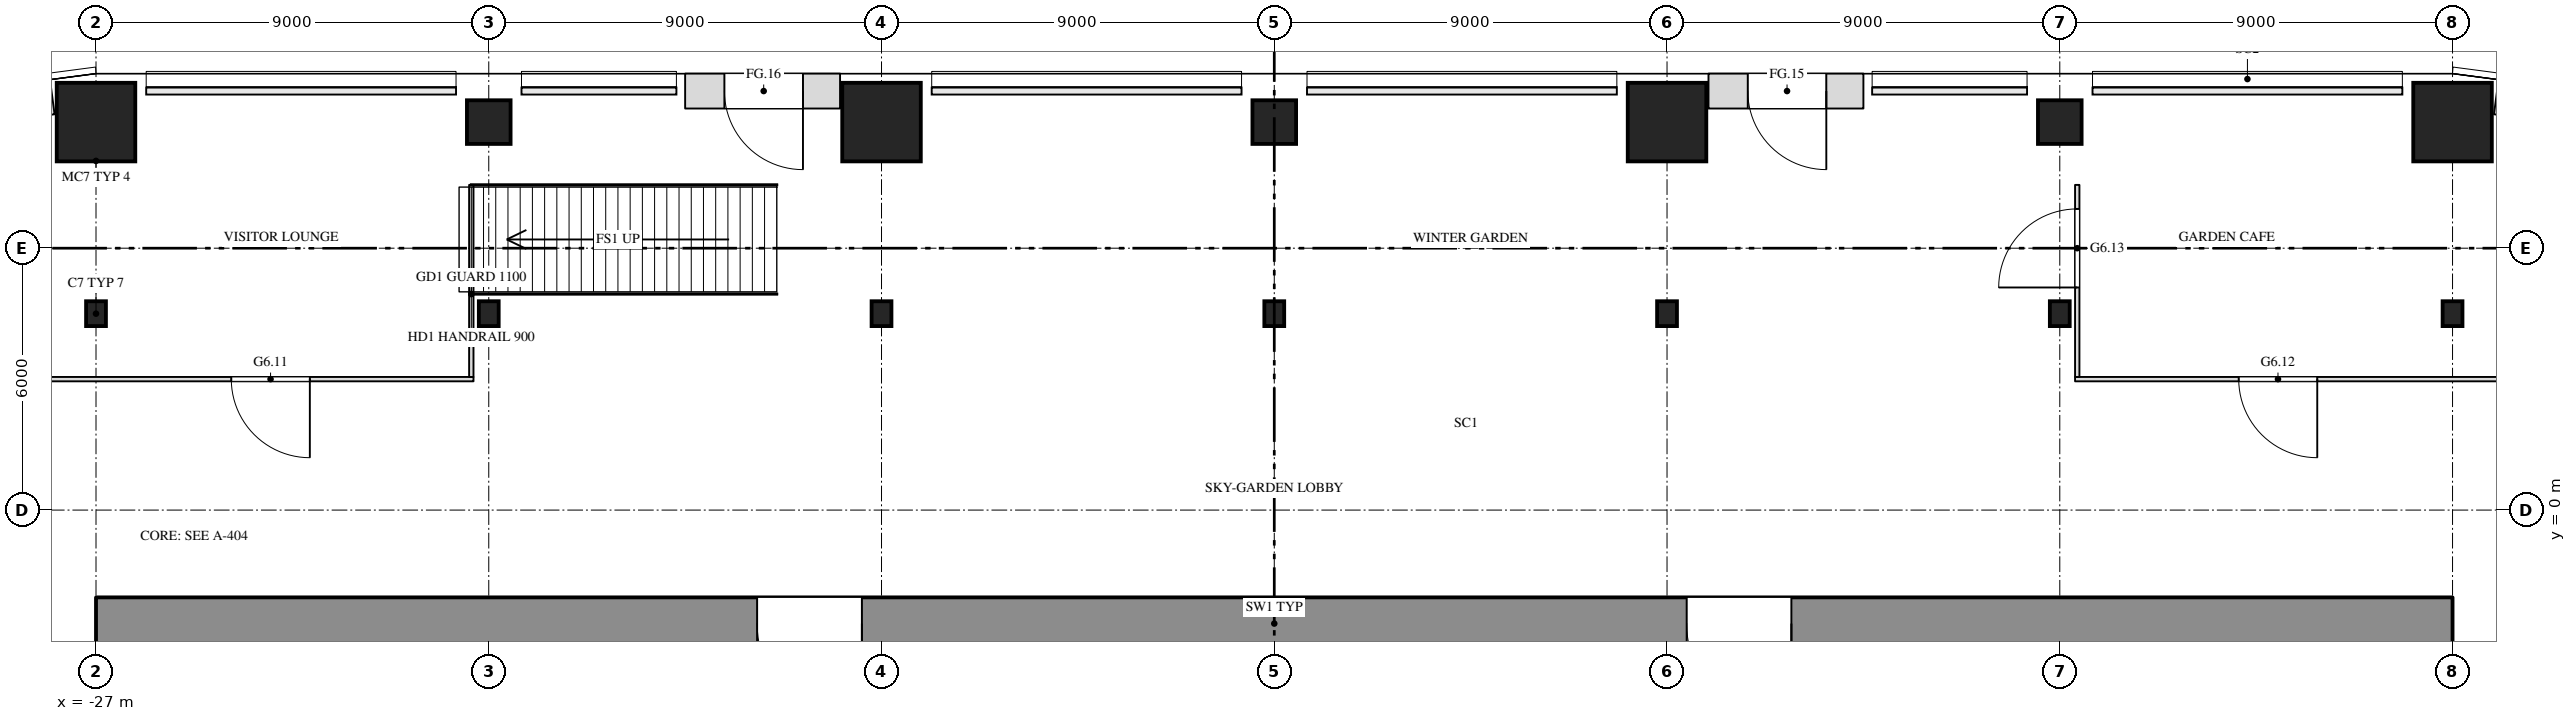
"""IFC4 building model, lengths in metres.
Left out: names, types, materials, properties, quantities, classifications, styles, units other than length and angle.
Written with IfcOpenShell. Run it as: python <this file> out.ifc"""

import sys

from ifc_helpers import new_model, si_unit, direction, frame, frame_2d, origin, origin_2d, place, context, subcontext, project, spatial, rectangle, i_section, extrude, clip, halfspace, element, fill, save


model = new_model("IFC4")
c1 = context("Model", 3, precision=1e-05, world=origin(), true_north=direction((0.0, 1.0)))
c2 = subcontext(c1, "Body", "Model", "MODEL_VIEW")
j1 = project(units=[si_unit("LENGTHUNIT", "METRE"), si_unit("PLANEANGLEUNIT", "RADIAN")], contexts=[c1])
p1 = place(None, origin())
s1 = spatial("IfcSite", under=j1, at=p1, CompositionType="ELEMENT")
p2 = place(p1, origin())
s2 = spatial("IfcBuilding", under=s1, at=p2, CompositionType="ELEMENT")
p3 = place(p2, frame((0.0, 0.0, 39.0)))
s3 = spatial("IfcBuildingStorey", under=s2, at=p3, CompositionType="ELEMENT", Elevation=39.0)
for number, where, z_axis, x_axis in (
    (1, (-27.0, 4.5, 0.0), (0.0, 0.0, 1.0), (1.0, 0.0, 0.0)),
    (2, (-18.0, 4.5, 0.0), (0.0, 0.0, 1.0), (1.0, 0.0, 0.0)),
    (3, (-9.0, 4.5, 0.0), (0.0, 0.0, 1.0), (1.0, 0.0, 0.0)),
    (4, (0.0, 4.5, 0.0), (0.0, 0.0, 1.0), (1.0, 0.0, 0.0)),
    (5, (9.0, 4.5, 0.0), (0.0, 0.0, 1.0), (1.0, 0.0, 0.0)),
    (6, (18.0, 4.5, 0.0), (0.0, 0.0, 1.0), (1.0, 0.0, 0.0)),
    (7, (27.0, 4.5, 0.0), (0.0, 0.0, 1.0), (1.0, 0.0, 0.0)),
):
    element("IfcColumn", number, at=place(p3, frame(where, z_axis=z_axis, x_axis=x_axis)), inside=s3, PredefinedType="COLUMN", context=c2, shape_type="SweptSolid", body=[
        extrude(i_section(OverallWidth=0.455, OverallDepth=0.569, WebThickness=0.078, FlangeThickness=0.125, at=origin_2d()), origin(), (0.0, 0.0, 1.0), 4.5),
    ])
p4 = place(p3, frame((-27.0, 8.0, 0.0), z_axis=(0.0, 0.595218167181, 0.80356414396), x_axis=(-1.0, 0.0, 0.0)))
e8 = element("IfcColumn", 8, at=p4, inside=s3, PredefinedType="COLUMN", context=c2, shape_type="Clipping", body=[
    clip(extrude(rectangle(XDim=1.8, YDim=1.8, at=origin_2d()), origin(), (0.0, 0.0, 1.0), 5.6), halfspace(frame((0.0, 0.0, 0.667)), True)),
])
p5 = place(p3, frame((-18.0, 8.0, 0.0), z_axis=(0.0, 0.595218167181, 0.80356414396), x_axis=(-1.0, 0.0, 0.0)))
e9 = element("IfcColumn", 9, at=p5, inside=s3, PredefinedType="COLUMN", context=c2, shape_type="Clipping", body=[
    clip(extrude(rectangle(XDim=1.0, YDim=1.0, at=origin_2d()), origin(), (0.0, 0.0, 1.0), 5.6), halfspace(frame((0.0, 0.0, 0.37)), True)),
])
p6 = place(p3, frame((-9.0, 8.0, 0.0), z_axis=(0.0, 0.595218167181, 0.80356414396), x_axis=(-1.0, 0.0, 0.0)))
e10 = element("IfcColumn", 10, at=p6, inside=s3, PredefinedType="COLUMN", context=c2, shape_type="SweptSolid", body=[
    extrude(rectangle(XDim=1.8, YDim=1.8, at=origin_2d()), origin(), (0.0, 0.0, 1.0), 5.6),
])
p7 = place(p3, frame((0.0, 8.0, 0.0), z_axis=(0.0, 0.595218167181, 0.80356414396), x_axis=(-1.0, 0.0, 0.0)))
e11 = element("IfcColumn", 11, at=p7, inside=s3, PredefinedType="COLUMN", context=c2, shape_type="SweptSolid", body=[
    extrude(rectangle(XDim=1.0, YDim=1.0, at=origin_2d()), origin(), (0.0, 0.0, 1.0), 5.6),
])
p8 = place(p3, frame((9.0, 8.0, 0.0), z_axis=(0.0, 0.595218167181, 0.80356414396), x_axis=(-1.0, 0.0, 0.0)))
e12 = element("IfcColumn", 12, at=p8, inside=s3, PredefinedType="COLUMN", context=c2, shape_type="SweptSolid", body=[
    extrude(rectangle(XDim=1.8, YDim=1.8, at=origin_2d()), origin(), (0.0, 0.0, 1.0), 5.6),
])
p9 = place(p3, frame((18.0, 8.0, 0.0), z_axis=(0.0, 0.595218167181, 0.80356414396), x_axis=(-1.0, 0.0, 0.0)))
e13 = element("IfcColumn", 13, at=p9, inside=s3, PredefinedType="COLUMN", context=c2, shape_type="Clipping", body=[
    clip(extrude(rectangle(XDim=1.0, YDim=1.0, at=origin_2d()), origin(), (0.0, 0.0, 1.0), 5.6), halfspace(frame((0.0, 0.0, 0.37)), True)),
])
p10 = place(p3, frame((27.0, 8.0, 0.0), z_axis=(0.0, 0.595218167181, 0.80356414396), x_axis=(-1.0, 0.0, 0.0)))
e14 = element("IfcColumn", 14, at=p10, inside=s3, PredefinedType="COLUMN", context=c2, shape_type="Clipping", body=[
    clip(extrude(rectangle(XDim=1.8, YDim=1.8, at=origin_2d()), origin(), (0.0, 0.0, 1.0), 5.6), halfspace(frame((0.0, 0.0, 0.667)), True)),
])
p11 = place(p3, frame((-27.0, -2.6, 0.0), z_axis=(0.0, 0.0, 1.0), x_axis=(1.0, 0.0, 0.0)))
e15 = element("IfcWall", 15, at=p11, inside=s3, PredefinedType="SHEAR", context=c2, shape_type="SweptSolid", body=[
    extrude(rectangle(XDim=54.0, YDim=1.2, at=frame_2d((27.0, 0.0))), origin(), (0.0, 0.0, 1.0), 4.25),
])
p12 = place(p11, frame((15.15, 0.0, 0.0)))
e16 = element("IfcOpeningElement", 16, at=p12, cuts=e15, PredefinedType="OPENING", context=c2, shape_type="SweptSolid", body=[
    extrude(rectangle(XDim=2.4, YDim=2.1, at=frame_2d((1.2, 1.05))), frame((0.0, 0.612, 0.0), z_axis=(0.0, -1.0, 0.0), x_axis=(1.0, 0.0, 0.0)), (0.0, 0.0, 1.0), 1.224),
])
p13 = place(p11, frame((36.45, 0.0, 0.0)))
e17 = element("IfcOpeningElement", 17, at=p13, cuts=e15, PredefinedType="OPENING", context=c2, shape_type="SweptSolid", body=[
    extrude(rectangle(XDim=2.4, YDim=2.1, at=frame_2d((1.2, 1.05))), frame((0.0, 0.612, 0.0), z_axis=(0.0, -1.0, 0.0), x_axis=(1.0, 0.0, 0.0)), (0.0, 0.0, 1.0), 1.224),
])
p14 = place(p3, frame((-32.516, 3.0, 0.0), z_axis=(0.0, 0.0, 1.0), x_axis=(1.0, 0.0, 0.0)))
e18 = element("IfcWall", 18, at=p14, inside=s3, PredefinedType="PARTITIONING", context=c2, shape_type="SweptSolid", body=[
    extrude(rectangle(XDim=14.166, YDim=0.1, at=frame_2d((7.083, 0.0))), origin(), (0.0, 0.0, 1.0), 4.25),
])
p15 = place(p14, frame((2.516, 0.0, 0.0)))
e19 = element("IfcOpeningElement", 19, at=p15, cuts=e18, PredefinedType="OPENING", context=c2, shape_type="SweptSolid", body=[
    extrude(rectangle(XDim=1.0, YDim=2.1, at=frame_2d((0.5, 1.05))), frame((0.0, 0.062, 0.0), z_axis=(0.0, -1.0, 0.0), x_axis=(1.0, 0.0, 0.0)), (0.0, 0.0, 1.0), 0.124),
])
p16 = place(p14, frame((8.616, 0.0, 0.0)))
e20 = element("IfcOpeningElement", 20, at=p16, cuts=e18, PredefinedType="OPENING", context=c2, shape_type="SweptSolid", body=[
    extrude(rectangle(XDim=1.8, YDim=2.1, at=frame_2d((0.9, 1.05))), frame((0.0, 0.062, 0.0), z_axis=(0.0, -1.0, 0.0), x_axis=(1.0, 0.0, 0.0)), (0.0, 0.0, 1.0), 0.124),
])
p17 = place(p3, frame((-18.4, 3.05, 0.0), z_axis=(0.0, 0.0, 1.0), x_axis=(0.0, 1.0, 0.0)))
e21 = element("IfcWall", 21, at=p17, inside=s3, PredefinedType="PARTITIONING", context=c2, shape_type="SweptSolid", body=[
    extrude(rectangle(XDim=4.4, YDim=0.1, at=frame_2d((2.2, 0.0))), origin(), (0.0, 0.0, 1.0), 4.25),
])
p18 = place(p3, frame((18.35, 3.0, 0.0), z_axis=(0.0, 0.0, 1.0), x_axis=(1.0, 0.0, 0.0)))
e22 = element("IfcWall", 22, at=p18, inside=s3, PredefinedType="PARTITIONING", context=c2, shape_type="SweptSolid", body=[
    extrude(rectangle(XDim=14.166, YDim=0.1, at=frame_2d((7.083, 0.0))), origin(), (0.0, 0.0, 1.0), 4.25),
])
p19 = place(p18, frame((3.75, 0.0, 0.0)))
e23 = element("IfcOpeningElement", 23, at=p19, cuts=e22, PredefinedType="OPENING", context=c2, shape_type="SweptSolid", body=[
    extrude(rectangle(XDim=1.8, YDim=2.1, at=frame_2d((0.9, 1.05))), frame((0.0, 0.062, 0.0), z_axis=(0.0, -1.0, 0.0), x_axis=(1.0, 0.0, 0.0)), (0.0, 0.0, 1.0), 0.124),
])
p20 = place(p3, frame((18.4, 3.05, 0.0), z_axis=(0.0, 0.0, 1.0), x_axis=(0.0, 1.0, 0.0)))
e24 = element("IfcWall", 24, at=p20, inside=s3, PredefinedType="PARTITIONING", context=c2, shape_type="SweptSolid", body=[
    extrude(rectangle(XDim=4.4, YDim=0.1, at=frame_2d((2.2, 0.0))), origin(), (0.0, 0.0, 1.0), 4.25),
])
p21 = place(p20, frame((2.05, 0.0, 0.0)))
e25 = element("IfcOpeningElement", 25, at=p21, cuts=e24, PredefinedType="OPENING", context=c2, shape_type="SweptSolid", body=[
    extrude(rectangle(XDim=1.8, YDim=2.1, at=frame_2d((0.9, 1.05))), frame((0.0, 0.062, 0.0), z_axis=(0.0, -1.0, 0.0), x_axis=(1.0, 0.0, 0.0)), (0.0, 0.0, 1.0), 0.124),
])
p22 = place(p3, frame((28.396, 9.413, 0.0), z_axis=(0.0, 0.0, 1.0), x_axis=(-0.99150434256, 0.130073589494, 0.0)))
e26 = element("IfcWall", 26, at=p22, inside=s3, PredefinedType="SOLIDWALL", context=c2, shape_type="SweptSolid", body=[
    extrude(rectangle(XDim=0.398, YDim=0.8, at=frame_2d((0.199, 0.0))), origin(), (0.0, 0.0, 1.0), 4.25),
])
p23 = place(p3, frame((13.5, 9.6, 0.0), z_axis=(0.0, 0.0, 1.0), x_axis=(-1.0, 0.0, 0.0)))
e27 = element("IfcWall", 27, at=p23, inside=s3, PredefinedType="SOLIDWALL", context=c2, shape_type="SweptSolid", body=[
    extrude(rectangle(XDim=3.55, YDim=0.8, at=frame_2d((1.775, 0.0))), origin(), (0.0, 0.0, 1.0), 4.25),
])
p24 = place(p23, frame((0.85, 0.0, 0.0)))
e28 = element("IfcOpeningElement", 28, at=p24, cuts=e27, PredefinedType="OPENING", context=c2, shape_type="SweptSolid", body=[
    extrude(rectangle(XDim=1.8, YDim=2.4, at=frame_2d((0.9, 1.2))), frame((0.0, 0.412, 0.0), z_axis=(0.0, -1.0, 0.0), x_axis=(1.0, 0.0, 0.0)), (0.0, 0.0, 1.0), 0.824),
])
p25 = place(p3, frame((-9.95, 9.6, 0.0), z_axis=(0.0, 0.0, 1.0), x_axis=(-1.0, 0.0, 0.0)))
e29 = element("IfcWall", 29, at=p25, inside=s3, PredefinedType="SOLIDWALL", context=c2, shape_type="SweptSolid", body=[
    extrude(rectangle(XDim=3.55, YDim=0.8, at=frame_2d((1.775, 0.0))), origin(), (0.0, 0.0, 1.0), 4.25),
])
p26 = place(p25, frame((0.85, 0.0, 0.0)))
e30 = element("IfcOpeningElement", 30, at=p26, cuts=e29, PredefinedType="OPENING", context=c2, shape_type="SweptSolid", body=[
    extrude(rectangle(XDim=1.8, YDim=2.4, at=frame_2d((0.9, 1.2))), frame((0.0, 0.412, 0.0), z_axis=(0.0, -1.0, 0.0), x_axis=(1.0, 0.0, 0.0)), (0.0, 0.0, 1.0), 0.824),
])
p27 = place(p3, frame((-28.002, 9.465, 0.0), z_axis=(0.0, 0.0, 1.0), x_axis=(-0.99150434256, -0.130073589494, 0.0)))
e31 = element("IfcWall", 31, at=p27, inside=s3, PredefinedType="SOLIDWALL", context=c2, shape_type="SweptSolid", body=[
    extrude(rectangle(XDim=0.398, YDim=0.8, at=frame_2d((0.199, 0.0))), origin(), (0.0, 0.0, 1.0), 4.25),
])
p28 = place(p16, origin())
e32 = element("IfcDoor", 32, at=p28, inside=s3, OperationType="DOUBLE_DOOR_SINGLE_SWING", PredefinedType="DOOR", context=c2, shape_type="SweptSolid", body=[
    extrude(rectangle(XDim=1.8, YDim=2.1, at=frame_2d((0.9, 1.05))), frame((0.0, 0.025, 0.0), z_axis=(0.0, -1.0, 0.0), x_axis=(1.0, 0.0, 0.0)), (0.0, 0.0, 1.0), 0.05),
])
fill(e20, e32)
p29 = place(p19, origin())
e33 = element("IfcDoor", 33, at=p29, inside=s3, OperationType="DOUBLE_DOOR_SINGLE_SWING", PredefinedType="DOOR", context=c2, shape_type="SweptSolid", body=[
    extrude(rectangle(XDim=1.8, YDim=2.1, at=frame_2d((0.9, 1.05))), frame((0.0, 0.025, 0.0), z_axis=(0.0, -1.0, 0.0), x_axis=(1.0, 0.0, 0.0)), (0.0, 0.0, 1.0), 0.05),
])
fill(e23, e33)
p30 = place(p21, origin())
e34 = element("IfcDoor", 34, at=p30, inside=s3, OperationType="DOUBLE_DOOR_SINGLE_SWING", PredefinedType="DOOR", context=c2, shape_type="SweptSolid", body=[
    extrude(rectangle(XDim=1.8, YDim=2.1, at=frame_2d((0.9, 1.05))), frame((0.0, 0.025, 0.0), z_axis=(0.0, -1.0, 0.0), x_axis=(1.0, 0.0, 0.0)), (0.0, 0.0, 1.0), 0.05),
])
fill(e25, e34)
p31 = place(p24, origin())
e35 = element("IfcDoor", 35, at=p31, inside=s3, OperationType="DOUBLE_DOOR_SINGLE_SWING", PredefinedType="DOOR", context=c2, shape_type="SweptSolid", body=[
    extrude(rectangle(XDim=1.8, YDim=2.4, at=frame_2d((0.9, 1.2))), frame((0.0, 0.025, 0.0), z_axis=(0.0, -1.0, 0.0), x_axis=(1.0, 0.0, 0.0)), (0.0, 0.0, 1.0), 0.05),
])
fill(e28, e35)
p32 = place(p26, origin())
e36 = element("IfcDoor", 36, at=p32, inside=s3, OperationType="DOUBLE_DOOR_SINGLE_SWING", PredefinedType="DOOR", context=c2, shape_type="SweptSolid", body=[
    extrude(rectangle(XDim=1.8, YDim=2.4, at=frame_2d((0.9, 1.2))), frame((0.0, 0.025, 0.0), z_axis=(0.0, -1.0, 0.0), x_axis=(1.0, 0.0, 0.0)), (0.0, 0.0, 1.0), 0.05),
])
fill(e30, e36)
p33 = place(p12, origin())
e37 = element("IfcDoor", 37, at=p33, inside=s3, OperationType="DOUBLE_DOOR_SINGLE_SWING", PredefinedType="DOOR", context=c2, shape_type="SweptSolid", body=[
    extrude(rectangle(XDim=2.4, YDim=2.1, at=frame_2d((1.2, 1.05))), frame((0.0, 0.025, 0.0), z_axis=(0.0, -1.0, 0.0), x_axis=(1.0, 0.0, 0.0)), (0.0, 0.0, 1.0), 0.05),
])
fill(e16, e37)
p34 = place(p13, origin())
e38 = element("IfcDoor", 38, at=p34, inside=s3, OperationType="DOUBLE_DOOR_SINGLE_SWING", PredefinedType="DOOR", context=c2, shape_type="SweptSolid", body=[
    extrude(rectangle(XDim=2.4, YDim=2.1, at=frame_2d((1.2, 1.05))), frame((0.0, 0.025, 0.0), z_axis=(0.0, -1.0, 0.0), x_axis=(1.0, 0.0, 0.0)), (0.0, 0.0, 1.0), 0.05),
])
fill(e17, e38)
save(model, sys.argv[1])
